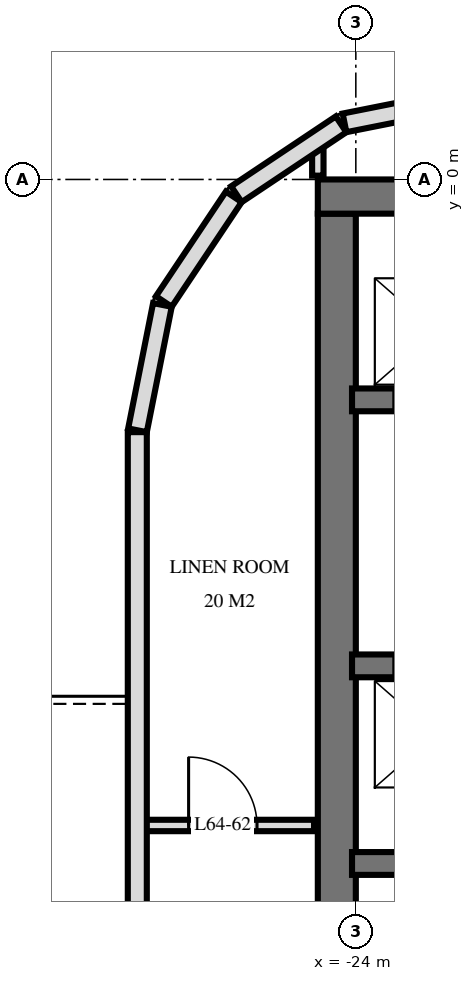
"""IFC4 building model, lengths in metres.
Left out: names, types, materials, properties, quantities, classifications, styles, units other than length and angle.
Written with IfcOpenShell. Run it as: python <this file> out.ifc"""

import sys

from ifc_helpers import new_model, si_unit, direction, frame, frame_2d, origin, place, context, subcontext, project, spatial, rectangle, extrude, element, fill, save


model = new_model("IFC4")
c1 = context("Model", 3, precision=1e-05, world=origin(), true_north=direction((0.0, 1.0)))
c2 = subcontext(c1, "Body", "Model", "MODEL_VIEW")
j1 = project(units=[si_unit("LENGTHUNIT", "METRE"), si_unit("PLANEANGLEUNIT", "RADIAN")], contexts=[c1])
p1 = place(None, origin())
s1 = spatial("IfcSite", under=j1, at=p1, CompositionType="ELEMENT")
p2 = place(p1, origin())
s2 = spatial("IfcBuilding", under=s1, at=p2, CompositionType="ELEMENT")
p3 = place(p2, frame((0.0, 0.0, 243.1)))
s3 = spatial("IfcBuildingStorey", under=s2, at=p3, CompositionType="ELEMENT", Elevation=243.1)
p4 = place(p3, frame((-24.5, -0.225, 0.0), z_axis=(0.0, 0.0, 1.0), x_axis=(1.0, 0.0, 0.0)))
e1 = element("IfcWall", 1, at=p4, inside=s3, PredefinedType="SHEAR", context=c2, shape_type="SweptSolid", body=[
    extrude(rectangle(XDim=14.5, YDim=0.45, at=frame_2d((7.25, 0.0))), origin(), (0.0, 0.0, 1.0), 3.5),
])
p5 = place(p3, frame((-24.25, -14.55, 0.0), z_axis=(0.0, 0.0, 1.0), x_axis=(0.0, 1.0, 0.0)))
e2 = element("IfcWall", 2, at=p5, inside=s3, PredefinedType="SHEAR", context=c2, shape_type="SweptSolid", body=[
    extrude(rectangle(XDim=14.1, YDim=0.5, at=frame_2d((7.05, 0.0))), origin(), (0.0, 0.0, 1.0), 3.5),
])
p6 = place(p3, frame((-24.05, -2.9, 0.0), z_axis=(0.0, 0.0, 1.0), x_axis=(1.0, 0.0, 0.0)))
e3 = element("IfcWall", 3, at=p6, inside=s3, PredefinedType="SHEAR", context=c2, shape_type="SweptSolid", body=[
    extrude(rectangle(XDim=13.7, YDim=0.3, at=frame_2d((6.85, 0.0))), origin(), (0.0, 0.0, 1.0), 3.5),
])
p7 = place(p6, frame((0.55, 0.0, 0.0)))
e4 = element("IfcOpeningElement", 4, at=p7, cuts=e3, PredefinedType="OPENING", context=c2, shape_type="SweptSolid", body=[
    extrude(rectangle(XDim=1.1, YDim=2.1, at=frame_2d((0.55, 1.05))), frame((0.0, 0.16, 0.0), z_axis=(0.0, -1.0, 0.0), x_axis=(1.0, 0.0, 0.0)), (0.0, 0.0, 1.0), 0.32),
])
p8 = place(p6, frame((6.613, 0.0, 0.0)))
e5 = element("IfcOpeningElement", 5, at=p8, cuts=e3, PredefinedType="OPENING", context=c2, shape_type="SweptSolid", body=[
    extrude(rectangle(XDim=0.9, YDim=2.1, at=frame_2d((0.45, 1.05))), frame((0.0, 0.16, 0.0), z_axis=(0.0, -1.0, 0.0), x_axis=(1.0, 0.0, 0.0)), (0.0, 0.0, 1.0), 0.32),
])
p9 = place(p6, frame((5.188, 0.0, 0.0)))
e6 = element("IfcOpeningElement", 6, at=p9, cuts=e3, PredefinedType="OPENING", context=c2, shape_type="SweptSolid", body=[
    extrude(rectangle(XDim=0.9, YDim=2.1, at=frame_2d((0.45, 1.05))), frame((0.0, 0.16, 0.0), z_axis=(0.0, -1.0, 0.0), x_axis=(1.0, 0.0, 0.0)), (0.0, 0.0, 1.0), 0.32),
])
p10 = place(p6, frame((3.0, 0.0, 0.0)))
e7 = element("IfcOpeningElement", 7, at=p10, cuts=e3, PredefinedType="OPENING", context=c2, shape_type="SweptSolid", body=[
    extrude(rectangle(XDim=1.0, YDim=2.1, at=frame_2d((0.5, 1.05))), frame((0.0, 0.16, 0.0), z_axis=(0.0, -1.0, 0.0), x_axis=(1.0, 0.0, 0.0)), (0.0, 0.0, 1.0), 0.32),
])
p11 = place(p3, frame((-24.05, -6.4, 0.0), z_axis=(0.0, 0.0, 1.0), x_axis=(1.0, 0.0, 0.0)))
e8 = element("IfcWall", 8, at=p11, inside=s3, PredefinedType="SHEAR", context=c2, shape_type="SweptSolid", body=[
    extrude(rectangle(XDim=13.7, YDim=0.3, at=frame_2d((6.85, 0.0))), origin(), (0.0, 0.0, 1.0), 3.5),
])
p12 = place(p11, frame((0.55, 0.0, 0.0)))
e9 = element("IfcOpeningElement", 9, at=p12, cuts=e8, PredefinedType="OPENING", context=c2, shape_type="SweptSolid", body=[
    extrude(rectangle(XDim=1.1, YDim=2.1, at=frame_2d((0.55, 1.05))), frame((0.0, 0.16, 0.0), z_axis=(0.0, -1.0, 0.0), x_axis=(1.0, 0.0, 0.0)), (0.0, 0.0, 1.0), 0.32),
])
p13 = place(p11, frame((5.8, 0.0, 0.0)))
e10 = element("IfcOpeningElement", 10, at=p13, cuts=e8, PredefinedType="OPENING", context=c2, shape_type="SweptSolid", body=[
    extrude(rectangle(XDim=1.1, YDim=2.1, at=frame_2d((0.55, 1.05))), frame((0.0, 0.16, 0.0), z_axis=(0.0, -1.0, 0.0), x_axis=(1.0, 0.0, 0.0)), (0.0, 0.0, 1.0), 0.32),
])
p14 = place(p3, frame((-24.05, -9.0, 0.0), z_axis=(0.0, 0.0, 1.0), x_axis=(1.0, 0.0, 0.0)))
e11 = element("IfcWall", 11, at=p14, inside=s3, PredefinedType="SHEAR", context=c2, shape_type="SweptSolid", body=[
    extrude(rectangle(XDim=13.7, YDim=0.3, at=frame_2d((6.85, 0.0))), origin(), (0.0, 0.0, 1.0), 3.5),
])
p15 = place(p14, frame((8.8, 0.0, 0.0)))
e12 = element("IfcOpeningElement", 12, at=p15, cuts=e11, PredefinedType="OPENING", context=c2, shape_type="SweptSolid", body=[
    extrude(rectangle(XDim=1.1, YDim=2.1, at=frame_2d((0.55, 1.05))), frame((0.0, 0.16, 0.0), z_axis=(0.0, -1.0, 0.0), x_axis=(1.0, 0.0, 0.0)), (0.0, 0.0, 1.0), 0.32),
])
p16 = place(p3, frame((-22.5, 1.073, 0.0), z_axis=(0.0, 0.0, 1.0), x_axis=(-0.980803419081, -0.194999110559, 0.0)))
e13 = element("IfcWall", 13, at=p16, inside=s3, PredefinedType="SOLIDWALL", context=c2, shape_type="SweptSolid", body=[
    extrude(rectangle(XDim=1.681, YDim=0.25, at=frame_2d((0.841, 0.0))), origin(), (0.0, 0.0, 1.0), 3.2),
])
for number, where, z_axis, x_axis in (
    (14, (-24.194, 0.726, 0.0), (0.0, 0.0, 1.0), (-0.831, -0.556, 0.0)),
    (15, (-25.606, -0.229, 0.0), (0.0, 0.0, 1.0), (-0.556, -0.831, 0.0)),
):
    element("IfcWall", number, at=place(p3, frame(where, z_axis=z_axis, x_axis=x_axis)), inside=s3, PredefinedType="SOLIDWALL", context=c2, shape_type="SweptSolid", body=[
        extrude(rectangle(XDim=1.656, YDim=0.25, at=frame_2d((0.828, 0.0))), origin(), (0.0, 0.0, 1.0), 3.2),
    ])
p17 = place(p3, frame((-26.545, -1.651, 0.0), z_axis=(0.0, 0.0, 1.0), x_axis=(-0.194999110559, -0.980803419081, 0.0)))
e16 = element("IfcWall", 16, at=p17, inside=s3, PredefinedType="SOLIDWALL", context=c2, shape_type="SweptSolid", body=[
    extrude(rectangle(XDim=1.681, YDim=0.25, at=frame_2d((0.841, 0.0))), origin(), (0.0, 0.0, 1.0), 3.2),
])
p18 = place(p3, frame((-26.875, -3.325, 0.0), z_axis=(0.0, 0.0, 1.0), x_axis=(0.0, -1.0, 0.0)))
e17 = element("IfcWall", 17, at=p18, inside=s3, PredefinedType="SOLIDWALL", context=c2, shape_type="SweptSolid", body=[
    extrude(rectangle(XDim=21.551, YDim=0.25, at=frame_2d((10.775, 0.0))), origin(), (0.0, 0.0, 1.0), 3.2),
])
p19 = place(p18, frame((7.525, 0.0, 0.0)))
e18 = element("IfcOpeningElement", 18, at=p19, cuts=e17, PredefinedType="OPENING", context=c2, shape_type="SweptSolid", body=[
    extrude(rectangle(XDim=1.8, YDim=2.4, at=frame_2d((0.9, 1.2))), frame((0.0, 0.135, 0.0), z_axis=(0.0, -1.0, 0.0), x_axis=(1.0, 0.0, 0.0)), (0.0, 0.0, 1.0), 0.27),
])
p20 = place(p18, frame((12.275, 0.0, 0.9)))
e19 = element("IfcOpeningElement", 19, at=p20, cuts=e17, PredefinedType="OPENING", context=c2, shape_type="SweptSolid", body=[
    extrude(rectangle(XDim=1.2, YDim=1.5, at=frame_2d((0.6, 0.75))), frame((0.0, 0.135, 0.0), z_axis=(0.0, -1.0, 0.0), x_axis=(1.0, 0.0, 0.0)), (0.0, 0.0, 1.0), 0.27),
])
p21 = place(p18, frame((15.275, 0.0, 0.0)))
e20 = element("IfcOpeningElement", 20, at=p21, cuts=e17, PredefinedType="OPENING", context=c2, shape_type="SweptSolid", body=[
    extrude(rectangle(XDim=1.8, YDim=2.4, at=frame_2d((0.9, 1.2))), frame((0.0, 0.135, 0.0), z_axis=(0.0, -1.0, 0.0), x_axis=(1.0, 0.0, 0.0)), (0.0, 0.0, 1.0), 0.27),
])
p22 = place(p18, frame((18.875, 0.0, 0.0)))
e21 = element("IfcOpeningElement", 21, at=p22, cuts=e17, PredefinedType="OPENING", context=c2, shape_type="SweptSolid", body=[
    extrude(rectangle(XDim=1.8, YDim=2.4, at=frame_2d((0.9, 1.2))), frame((0.0, 0.135, 0.0), z_axis=(0.0, -1.0, 0.0), x_axis=(1.0, 0.0, 0.0)), (0.0, 0.0, 1.0), 0.27),
])
p23 = place(p3, frame((-24.5, 0.05, 0.0), z_axis=(0.0, 0.0, 1.0), x_axis=(0.0, 1.0, 0.0)))
e22 = element("IfcWall", 22, at=p23, inside=s3, PredefinedType="PARTITIONING", context=c2, shape_type="SweptSolid", body=[
    extrude(rectangle(XDim=0.405, YDim=0.15, at=frame_2d((0.203, 0.0))), origin(), (0.0, 0.0, 1.0), 3.22),
])
p24 = place(p3, frame((-26.82, -8.5, 0.0), z_axis=(0.0, 0.0, 1.0), x_axis=(1.0, 0.0, 0.0)))
e23 = element("IfcWall", 23, at=p24, inside=s3, PredefinedType="PARTITIONING", context=c2, shape_type="SweptSolid", body=[
    extrude(rectangle(XDim=2.27, YDim=0.15, at=frame_2d((1.135, 0.0))), origin(), (0.0, 0.0, 1.0), 3.22),
])
p25 = place(p24, frame((0.62, 0.0, 0.0)))
e24 = element("IfcOpeningElement", 24, at=p25, cuts=e23, PredefinedType="OPENING", context=c2, shape_type="SweptSolid", body=[
    extrude(rectangle(XDim=0.9, YDim=2.1, at=frame_2d((0.45, 1.05))), frame((0.0, 0.085, 0.0), z_axis=(0.0, -1.0, 0.0), x_axis=(1.0, 0.0, 0.0)), (0.0, 0.0, 1.0), 0.17),
])
p26 = place(p25, origin())
e25 = element("IfcDoor", 25, at=p26, inside=s3, OperationType="SINGLE_SWING_RIGHT", PredefinedType="DOOR", context=c2, shape_type="SweptSolid", body=[
    extrude(rectangle(XDim=0.9, YDim=2.1, at=frame_2d((0.45, 1.05))), frame((0.0, 0.025, 0.0), z_axis=(0.0, -1.0, 0.0), x_axis=(1.0, 0.0, 0.0)), (0.0, 0.0, 1.0), 0.05),
])
fill(e24, e25)
save(model, sys.argv[1])
